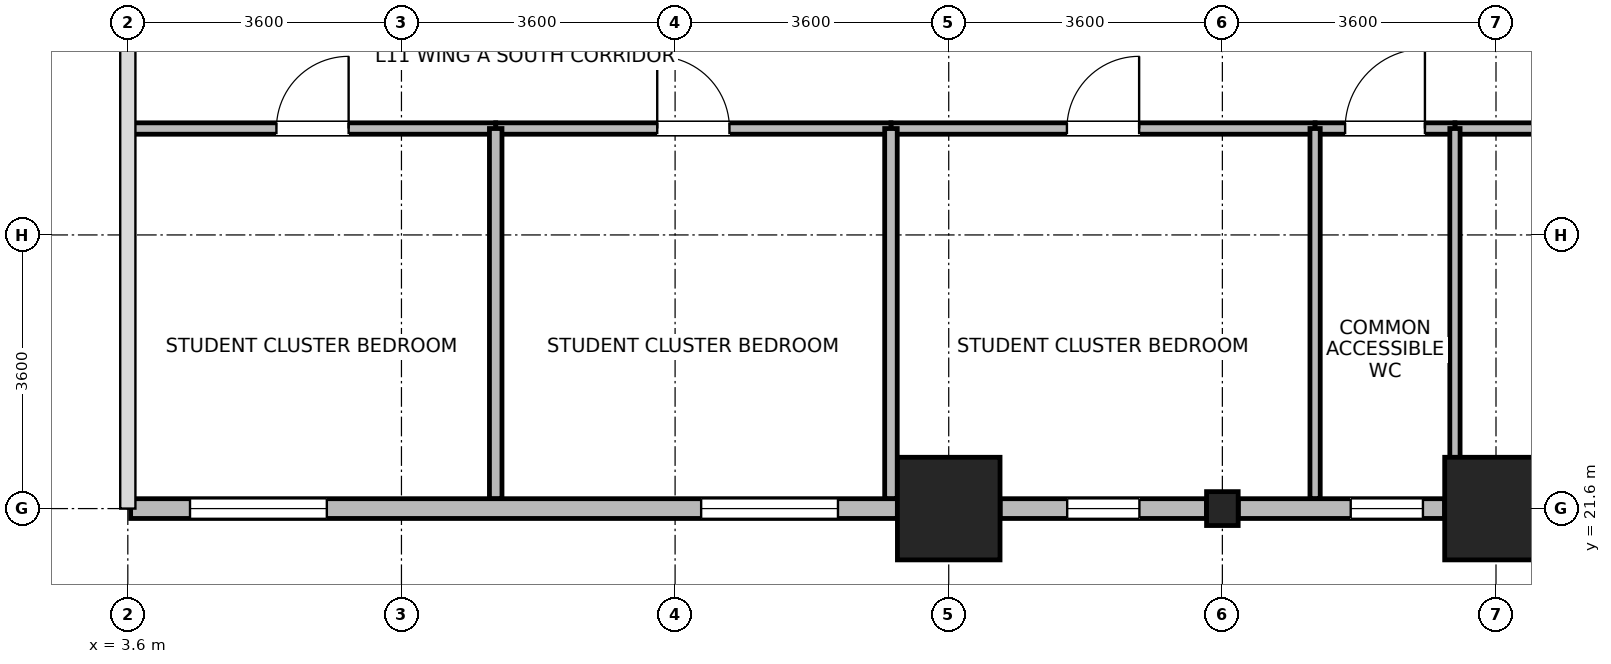
"""IFC4 building model, lengths in metres.
Left out: names, types, materials, properties, quantities, classifications, styles, units other than length and angle.
Written with IfcOpenShell. Run it as: python <this file> out.ifc"""

import sys

from ifc_helpers import new_model, si_unit, direction, frame, frame_2d, origin, origin_2d, place, context, subcontext, project, spatial, rectangle, i_section, extrude, source, transform, mapped, element, fill, save


model = new_model("IFC4")
c1 = context("Model", 3, precision=1e-05, world=origin(), true_north=direction((0.0, 1.0)))
c2 = subcontext(c1, "Body", "Model", "MODEL_VIEW")
j1 = project(units=[si_unit("LENGTHUNIT", "METRE"), si_unit("PLANEANGLEUNIT", "RADIAN")], contexts=[c1])
p1 = place(None, origin())
s1 = spatial("IfcSite", under=j1, at=p1, CompositionType="ELEMENT")
p2 = place(p1, origin())
s2 = spatial("IfcBuilding", under=s1, at=p2, CompositionType="ELEMENT")
p3 = place(p2, frame((0.0, 0.0, 47.5)))
s3 = spatial("IfcBuildingStorey", under=s2, at=p3, CompositionType="ELEMENT", Elevation=47.5)
m1 = source(origin(), c2, "Body", "SweptSolid", [
    extrude(rectangle(XDim=1.35, YDim=1.35, at=origin_2d()), origin(), (0.0, 0.0, 1.0), 3.7),
])
for number, where, z_axis, x_axis in (
    (1, (14.4, 21.6, 0.0), (0.0, 0.0, 1.0), (1.0, 0.0, 0.0)),
    (2, (21.6, 21.6, 0.0), (0.0, 0.0, 1.0), (1.0, 0.0, 0.0)),
):
    element("IfcColumn", number, at=place(p3, frame(where, z_axis=z_axis, x_axis=x_axis)), inside=s3, PredefinedType="COLUMN", context=c2, shape_type="MappedRepresentation", body=[
        mapped(m1, transform((0.0, 0.0, 0.0), x_axis=(1.0, 0.0, 0.0), y_axis=(0.0, 1.0, 0.0), z_axis=(0.0, 0.0, 1.0), scale=1.0)),
    ])
m2 = source(origin(), c2, "Body", "SweptSolid", [
    extrude(i_section(OverallWidth=0.416, OverallDepth=0.446, WebThickness=0.029, FlangeThickness=0.04, FilletRadius=0.015, at=origin_2d()), origin(), (0.0, 0.0, 1.0), 3.7),
])
p4 = place(p3, frame((18.0, 21.6, 0.0), z_axis=(0.0, 0.0, 1.0), x_axis=(1.0, 0.0, 0.0)))
e3 = element("IfcColumn", 3, at=p4, inside=s3, PredefinedType="COLUMN", context=c2, shape_type="MappedRepresentation", body=[
    mapped(m2, transform((0.0, 0.0, 0.0), x_axis=(1.0, 0.0, 0.0), y_axis=(0.0, 1.0, 0.0), z_axis=(0.0, 0.0, 1.0), scale=1.0)),
])
p5 = place(p3, frame((13.724, 21.6, 0.0), z_axis=(0.0, 0.0, 1.0), x_axis=(-1.0, 0.0, 0.0)))
e4 = element("IfcWall", 4, at=p5, inside=s3, PredefinedType="STANDARD", context=c2, shape_type="SweptSolid", body=[
    extrude(rectangle(XDim=10.087, YDim=0.26, at=frame_2d((5.043, 0.0))), origin(), (0.0, 0.0, 1.0), 3.43),
])
p6 = place(p5, frame((0.781, 0.0, 0.85)))
e5 = element("IfcOpeningElement", 5, at=p6, cuts=e4, PredefinedType="OPENING", context=c2, shape_type="SweptSolid", body=[
    extrude(rectangle(XDim=1.8, YDim=1.85, at=frame_2d((0.9, 0.925))), frame((0.0, 0.14, 0.0), z_axis=(0.0, -1.0, 0.0), x_axis=(1.0, 0.0, 0.0)), (0.0, 0.0, 1.0), 0.28),
])
p7 = place(p5, frame((7.506, 0.0, 0.85)))
e6 = element("IfcOpeningElement", 6, at=p7, cuts=e4, PredefinedType="OPENING", context=c2, shape_type="SweptSolid", body=[
    extrude(rectangle(XDim=1.8, YDim=1.85, at=frame_2d((0.9, 0.925))), frame((0.0, 0.14, 0.0), z_axis=(0.0, -1.0, 0.0), x_axis=(1.0, 0.0, 0.0)), (0.0, 0.0, 1.0), 0.28),
])
p8 = place(p3, frame((17.791, 21.6, 0.0), z_axis=(0.0, 0.0, 1.0), x_axis=(-1.0, 0.0, 0.0)))
e7 = element("IfcWall", 7, at=p8, inside=s3, PredefinedType="STANDARD", context=c2, shape_type="SweptSolid", body=[
    extrude(rectangle(XDim=2.715, YDim=0.26, at=frame_2d((1.357, 0.0))), origin(), (0.0, 0.0, 1.0), 2.93),
])
p9 = place(p8, frame((0.883, 0.0, 0.85)))
e8 = element("IfcOpeningElement", 8, at=p9, cuts=e7, PredefinedType="OPENING", context=c2, shape_type="SweptSolid", body=[
    extrude(rectangle(XDim=0.95, YDim=1.75, at=frame_2d((0.475, 0.875))), frame((0.0, 0.14, 0.0), z_axis=(0.0, -1.0, 0.0), x_axis=(1.0, 0.0, 0.0)), (0.0, 0.0, 1.0), 0.28),
])
p10 = place(p3, frame((20.924, 21.6, 0.0), z_axis=(0.0, 0.0, 1.0), x_axis=(-1.0, 0.0, 0.0)))
e9 = element("IfcWall", 9, at=p10, inside=s3, PredefinedType="STANDARD", context=c2, shape_type="SweptSolid", body=[
    extrude(rectangle(XDim=2.715, YDim=0.26, at=frame_2d((1.357, 0.0))), origin(), (0.0, 0.0, 1.0), 2.93),
])
p11 = place(p10, frame((0.285, 0.0, 0.85)))
e10 = element("IfcOpeningElement", 10, at=p11, cuts=e9, PredefinedType="OPENING", context=c2, shape_type="SweptSolid", body=[
    extrude(rectangle(XDim=0.95, YDim=1.75, at=frame_2d((0.475, 0.875))), frame((0.0, 0.14, 0.0), z_axis=(0.0, -1.0, 0.0), x_axis=(1.0, 0.0, 0.0)), (0.0, 0.0, 1.0), 0.28),
])
p12 = place(p3, frame((21.06, 26.6, 0.0), z_axis=(0.0, 0.0, 1.0), x_axis=(1.0, 0.0, 0.0)))
e11 = element("IfcWall", 11, at=p12, inside=s3, PredefinedType="PARTITIONING", context=c2, shape_type="SweptSolid", body=[
    extrude(rectangle(XDim=12.3, YDim=0.15, at=frame_2d((6.15, 0.0))), origin(), (0.0, 0.0, 1.0), 3.43),
])
p13 = place(p12, frame((5.5, 0.0, 0.0)))
e12 = element("IfcOpeningElement", 12, at=p13, cuts=e11, PredefinedType="OPENING", context=c2, shape_type="SweptSolid", body=[
    extrude(rectangle(XDim=1.3, YDim=2.12, at=frame_2d((0.65, 1.06))), frame((0.0, 0.085, 0.0), z_axis=(0.0, -1.0, 0.0), x_axis=(1.0, 0.0, 0.0)), (0.0, 0.0, 1.0), 0.17),
])
p14 = place(p3, frame((13.64, 26.6, 0.0), z_axis=(0.0, 0.0, 1.0), x_axis=(1.0, 0.0, 0.0)))
e13 = element("IfcWall", 13, at=p14, inside=s3, PredefinedType="PARTITIONING", context=c2, shape_type="SweptSolid", body=[
    extrude(rectangle(XDim=5.58, YDim=0.15, at=frame_2d((2.79, 0.0))), origin(), (0.0, 0.0, 1.0), 3.43),
])
p15 = place(p14, frame((2.315, 0.0, 0.0)))
e14 = element("IfcOpeningElement", 14, at=p15, cuts=e13, PredefinedType="OPENING", context=c2, shape_type="SweptSolid", body=[
    extrude(rectangle(XDim=0.95, YDim=2.1, at=frame_2d((0.475, 1.05))), frame((0.0, 0.085, 0.0), z_axis=(0.0, -1.0, 0.0), x_axis=(1.0, 0.0, 0.0)), (0.0, 0.0, 1.0), 0.17),
])
p16 = place(p3, frame((8.44, 26.6, 0.0), z_axis=(0.0, 0.0, 1.0), x_axis=(1.0, 0.0, 0.0)))
e15 = element("IfcWall", 15, at=p16, inside=s3, PredefinedType="PARTITIONING", context=c2, shape_type="SweptSolid", body=[
    extrude(rectangle(XDim=5.2, YDim=0.15, at=frame_2d((2.6, 0.0))), origin(), (0.0, 0.0, 1.0), 3.43),
])
p17 = place(p16, frame((2.125, 0.0, 0.0)))
e16 = element("IfcOpeningElement", 16, at=p17, cuts=e15, PredefinedType="OPENING", context=c2, shape_type="SweptSolid", body=[
    extrude(rectangle(XDim=0.95, YDim=2.1, at=frame_2d((0.475, 1.05))), frame((0.0, 0.085, 0.0), z_axis=(0.0, -1.0, 0.0), x_axis=(1.0, 0.0, 0.0)), (0.0, 0.0, 1.0), 0.17),
])
p18 = place(p3, frame((3.62, 26.6, 0.0), z_axis=(0.0, 0.0, 1.0), x_axis=(1.0, 0.0, 0.0)))
e17 = element("IfcWall", 17, at=p18, inside=s3, PredefinedType="PARTITIONING", context=c2, shape_type="SweptSolid", body=[
    extrude(rectangle(XDim=4.82, YDim=0.15, at=frame_2d((2.41, 0.0))), origin(), (0.0, 0.0, 1.0), 3.43),
])
p19 = place(p18, frame((1.935, 0.0, 0.0)))
e18 = element("IfcOpeningElement", 18, at=p19, cuts=e17, PredefinedType="OPENING", context=c2, shape_type="SweptSolid", body=[
    extrude(rectangle(XDim=0.95, YDim=2.1, at=frame_2d((0.475, 1.05))), frame((0.0, 0.085, 0.0), z_axis=(0.0, -1.0, 0.0), x_axis=(1.0, 0.0, 0.0)), (0.0, 0.0, 1.0), 0.17),
])
p20 = place(p3, frame((19.22, 26.6, 0.0), z_axis=(0.0, 0.0, 1.0), x_axis=(1.0, 0.0, 0.0)))
e19 = element("IfcWall", 19, at=p20, inside=s3, PredefinedType="PARTITIONING", context=c2, shape_type="SweptSolid", body=[
    extrude(rectangle(XDim=1.84, YDim=0.15, at=frame_2d((0.92, 0.0))), origin(), (0.0, 0.0, 1.0), 3.43),
])
p21 = place(p20, frame((0.395, 0.0, 0.0)))
e20 = element("IfcOpeningElement", 20, at=p21, cuts=e19, PredefinedType="OPENING", context=c2, shape_type="SweptSolid", body=[
    extrude(rectangle(XDim=1.05, YDim=2.12, at=frame_2d((0.525, 1.06))), frame((0.0, 0.085, 0.0), z_axis=(0.0, -1.0, 0.0), x_axis=(1.0, 0.0, 0.0)), (0.0, 0.0, 1.0), 0.17),
])
for number, where, z_axis, x_axis in (
    (21, (8.44, 21.732, 0.0), (0.0, 0.0, 1.0), (0.0, 1.0, 0.0)),
    (22, (13.64, 21.732, 0.0), (0.0, 0.0, 1.0), (0.0, 1.0, 0.0)),
):
    element("IfcWall", number, at=place(p3, frame(where, z_axis=z_axis, x_axis=x_axis)), inside=s3, PredefinedType="PARTITIONING", context=c2, shape_type="SweptSolid", body=[
        extrude(rectangle(XDim=4.868, YDim=0.165, at=frame_2d((2.434, 0.0))), origin(), (0.0, 0.0, 1.0), 3.43),
    ])
for number, where, z_axis, x_axis in (
    (23, (19.22, 21.732, 0.0), (0.0, 0.0, 1.0), (0.0, 1.0, 0.0)),
    (24, (21.06, 21.732, 0.0), (0.0, 0.0, 1.0), (0.0, 1.0, 0.0)),
):
    element("IfcWall", number, at=place(p3, frame(where, z_axis=z_axis, x_axis=x_axis)), inside=s3, PredefinedType="PARTITIONING", context=c2, shape_type="SweptSolid", body=[
        extrude(rectangle(XDim=4.868, YDim=0.135, at=frame_2d((2.434, 0.0))), origin(), (0.0, 0.0, 1.0), 3.43),
    ])
p22 = place(p6, origin())
e25 = element("IfcWindow", 25, at=p22, inside=s3, PartitioningType="SINGLE_PANEL", PredefinedType="WINDOW", context=c2, shape_type="SweptSolid", body=[
    extrude(rectangle(XDim=1.8, YDim=1.85, at=frame_2d((0.9, 0.925))), frame((0.0, 0.03, 0.0), z_axis=(0.0, -1.0, 0.0), x_axis=(1.0, 0.0, 0.0)), (0.0, 0.0, 1.0), 0.06),
])
fill(e5, e25)
p23 = place(p7, origin())
e26 = element("IfcWindow", 26, at=p23, inside=s3, PartitioningType="SINGLE_PANEL", PredefinedType="WINDOW", context=c2, shape_type="SweptSolid", body=[
    extrude(rectangle(XDim=1.8, YDim=1.85, at=frame_2d((0.9, 0.925))), frame((0.0, 0.03, 0.0), z_axis=(0.0, -1.0, 0.0), x_axis=(1.0, 0.0, 0.0)), (0.0, 0.0, 1.0), 0.06),
])
fill(e6, e26)
p24 = place(p9, origin())
e27 = element("IfcWindow", 27, at=p24, inside=s3, PartitioningType="SINGLE_PANEL", PredefinedType="WINDOW", context=c2, shape_type="SweptSolid", body=[
    extrude(rectangle(XDim=0.95, YDim=1.75, at=frame_2d((0.475, 0.875))), frame((0.0, 0.03, 0.0), z_axis=(0.0, -1.0, 0.0), x_axis=(1.0, 0.0, 0.0)), (0.0, 0.0, 1.0), 0.06),
])
fill(e8, e27)
p25 = place(p11, origin())
e28 = element("IfcWindow", 28, at=p25, inside=s3, PartitioningType="SINGLE_PANEL", PredefinedType="WINDOW", context=c2, shape_type="SweptSolid", body=[
    extrude(rectangle(XDim=0.95, YDim=1.75, at=frame_2d((0.475, 0.875))), frame((0.0, 0.03, 0.0), z_axis=(0.0, -1.0, 0.0), x_axis=(1.0, 0.0, 0.0)), (0.0, 0.0, 1.0), 0.06),
])
fill(e10, e28)
p26 = place(p15, origin())
e29 = element("IfcDoor", 29, at=p26, inside=s3, OperationType="SINGLE_SWING_RIGHT", PredefinedType="DOOR", context=c2, shape_type="SweptSolid", body=[
    extrude(rectangle(XDim=0.95, YDim=2.1, at=frame_2d((0.475, 1.05))), frame((0.0, 0.025, 0.0), z_axis=(0.0, -1.0, 0.0), x_axis=(1.0, 0.0, 0.0)), (0.0, 0.0, 1.0), 0.05),
])
fill(e14, e29)
p27 = place(p17, origin())
e30 = element("IfcDoor", 30, at=p27, inside=s3, OperationType="SINGLE_SWING_LEFT", PredefinedType="DOOR", context=c2, shape_type="SweptSolid", body=[
    extrude(rectangle(XDim=0.95, YDim=2.1, at=frame_2d((0.475, 1.05))), frame((0.0, 0.025, 0.0), z_axis=(0.0, -1.0, 0.0), x_axis=(1.0, 0.0, 0.0)), (0.0, 0.0, 1.0), 0.05),
])
fill(e16, e30)
p28 = place(p19, origin())
e31 = element("IfcDoor", 31, at=p28, inside=s3, OperationType="SINGLE_SWING_RIGHT", PredefinedType="DOOR", context=c2, shape_type="SweptSolid", body=[
    extrude(rectangle(XDim=0.95, YDim=2.1, at=frame_2d((0.475, 1.05))), frame((0.0, 0.025, 0.0), z_axis=(0.0, -1.0, 0.0), x_axis=(1.0, 0.0, 0.0)), (0.0, 0.0, 1.0), 0.05),
])
fill(e18, e31)
p29 = place(p21, origin())
e32 = element("IfcDoor", 32, at=p29, inside=s3, OperationType="SINGLE_SWING_RIGHT", PredefinedType="DOOR", context=c2, shape_type="SweptSolid", body=[
    extrude(rectangle(XDim=1.05, YDim=2.12, at=frame_2d((0.525, 1.06))), frame((0.0, 0.025, 0.0), z_axis=(0.0, -1.0, 0.0), x_axis=(1.0, 0.0, 0.0)), (0.0, 0.0, 1.0), 0.05),
])
fill(e20, e32)
save(model, sys.argv[1])
